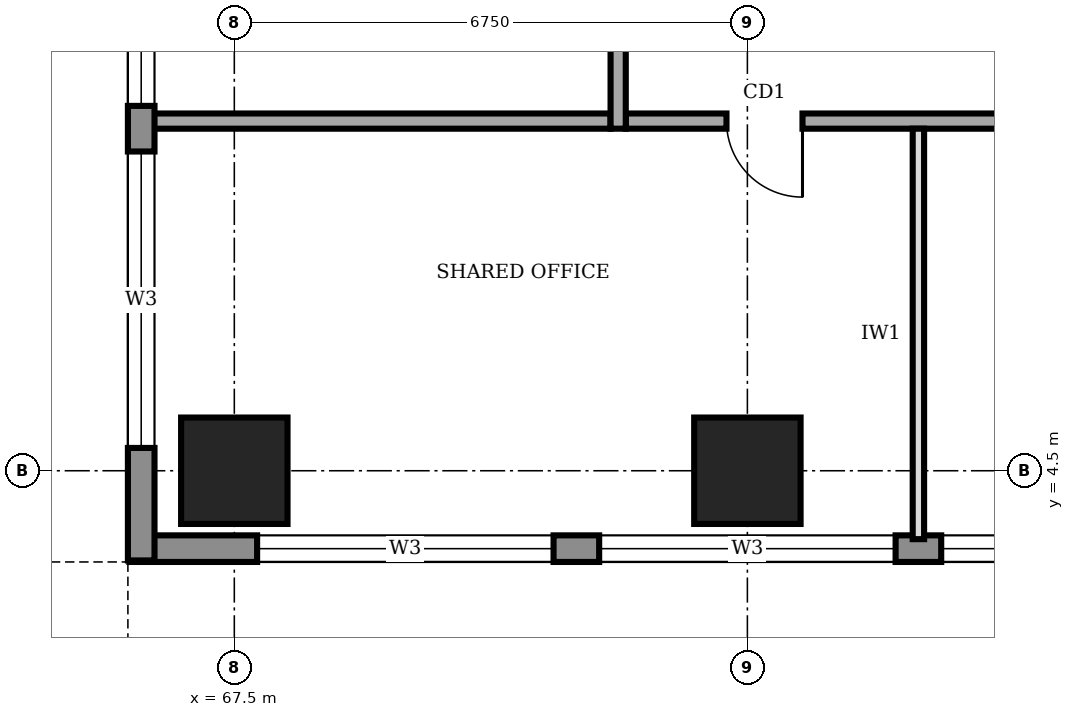
"""IFC4 building model, lengths in metres.
Left out: names, types, materials, properties, quantities, classifications, styles, units other than length and angle.
Written with IfcOpenShell. Run it as: python <this file> out.ifc"""

import sys

from ifc_helpers import new_model, si_unit, direction, frame, frame_2d, origin, origin_2d, place, context, subcontext, project, spatial, rectangle, extrude, element, fill, save


model = new_model("IFC4")
c1 = context("Model", 3, precision=1e-05, world=origin(), true_north=direction((0.0, 1.0)))
c2 = subcontext(c1, "Body", "Model", "MODEL_VIEW")
j1 = project(units=[si_unit("LENGTHUNIT", "METRE"), si_unit("PLANEANGLEUNIT", "RADIAN")], contexts=[c1])
p1 = place(None, origin())
s1 = spatial("IfcSite", under=j1, at=p1, CompositionType="ELEMENT")
p2 = place(p1, origin())
s2 = spatial("IfcBuilding", under=s1, at=p2, CompositionType="ELEMENT")
p3 = place(p2, frame((0.0, 0.0, 185.0)))
s3 = spatial("IfcBuildingStorey", under=s2, at=p3, CompositionType="ELEMENT", Elevation=185.0)
for number, where, z_axis, x_axis in (
    (1, (67.5, 4.5, 0.0), (0.0, 0.0, 1.0), (1.0, 0.0, 0.0)),
    (2, (74.25, 4.5, 0.0), (0.0, 0.0, 1.0), (1.0, 0.0, 0.0)),
):
    element("IfcColumn", number, at=place(p3, frame(where, z_axis=z_axis, x_axis=x_axis)), inside=s3, PredefinedType="COLUMN", context=c2, shape_type="SweptSolid", body=[
        extrude(rectangle(XDim=1.4, YDim=1.4, at=origin_2d()), origin(), (0.0, 0.0, 1.0), 4.0),
    ])
p4 = place(p3, frame((66.12, 3.475, 0.0), z_axis=(0.0, 0.0, 1.0), x_axis=(1.0, 0.0, 0.0)))
e3 = element("IfcWall", 3, at=p4, inside=s3, PredefinedType="STANDARD", context=c2, shape_type="SweptSolid", body=[
    extrude(rectangle(XDim=29.91, YDim=0.35, at=frame_2d((14.955, 0.0))), origin(), (0.0, 0.0, 1.0), 3.75),
])
p5 = place(p4, frame((1.68, 0.0, 0.95)))
e4 = element("IfcOpeningElement", 4, at=p5, cuts=e3, PredefinedType="OPENING", context=c2, shape_type="SweptSolid", body=[
    extrude(rectangle(XDim=3.9, YDim=1.8, at=frame_2d((1.95, 0.9))), frame((0.0, 0.185, 0.0), z_axis=(0.0, -1.0, 0.0), x_axis=(1.0, 0.0, 0.0)), (0.0, 0.0, 1.0), 0.37),
])
p6 = place(p4, frame((6.18, 0.0, 0.95)))
e5 = element("IfcOpeningElement", 5, at=p6, cuts=e3, PredefinedType="OPENING", context=c2, shape_type="SweptSolid", body=[
    extrude(rectangle(XDim=3.9, YDim=1.8, at=frame_2d((1.95, 0.9))), frame((0.0, 0.185, 0.0), z_axis=(0.0, -1.0, 0.0), x_axis=(1.0, 0.0, 0.0)), (0.0, 0.0, 1.0), 0.37),
])
p7 = place(p4, frame((10.68, 0.0, 0.95)))
e6 = element("IfcOpeningElement", 6, at=p7, cuts=e3, PredefinedType="OPENING", context=c2, shape_type="SweptSolid", body=[
    extrude(rectangle(XDim=3.9, YDim=1.8, at=frame_2d((1.95, 0.9))), frame((0.0, 0.185, 0.0), z_axis=(0.0, -1.0, 0.0), x_axis=(1.0, 0.0, 0.0)), (0.0, 0.0, 1.0), 0.37),
])
p8 = place(p4, frame((15.18, 0.0, 0.95)))
e7 = element("IfcOpeningElement", 7, at=p8, cuts=e3, PredefinedType="OPENING", context=c2, shape_type="SweptSolid", body=[
    extrude(rectangle(XDim=3.9, YDim=1.8, at=frame_2d((1.95, 0.9))), frame((0.0, 0.185, 0.0), z_axis=(0.0, -1.0, 0.0), x_axis=(1.0, 0.0, 0.0)), (0.0, 0.0, 1.0), 0.37),
])
p9 = place(p4, frame((19.68, 0.0, 0.95)))
e8 = element("IfcOpeningElement", 8, at=p9, cuts=e3, PredefinedType="OPENING", context=c2, shape_type="SweptSolid", body=[
    extrude(rectangle(XDim=3.9, YDim=1.8, at=frame_2d((1.95, 0.9))), frame((0.0, 0.185, 0.0), z_axis=(0.0, -1.0, 0.0), x_axis=(1.0, 0.0, 0.0)), (0.0, 0.0, 1.0), 0.37),
])
p10 = place(p4, frame((24.18, 0.0, 0.95)))
e9 = element("IfcOpeningElement", 9, at=p10, cuts=e3, PredefinedType="OPENING", context=c2, shape_type="SweptSolid", body=[
    extrude(rectangle(XDim=3.9, YDim=1.8, at=frame_2d((1.95, 0.9))), frame((0.0, 0.185, 0.0), z_axis=(0.0, -1.0, 0.0), x_axis=(1.0, 0.0, 0.0)), (0.0, 0.0, 1.0), 0.37),
])
p11 = place(p3, frame((66.275, 37.18, 0.0), z_axis=(0.0, 0.0, 1.0), x_axis=(0.0, -1.0, 0.0)))
e10 = element("IfcWall", 10, at=p11, inside=s3, PredefinedType="STANDARD", context=c2, shape_type="SweptSolid", body=[
    extrude(rectangle(XDim=33.86, YDim=0.35, at=frame_2d((16.93, 0.0))), origin(), (0.0, 0.0, 1.0), 3.75),
])
p12 = place(p11, frame((28.48, 0.0, 0.95)))
e11 = element("IfcOpeningElement", 11, at=p12, cuts=e10, PredefinedType="OPENING", context=c2, shape_type="SweptSolid", body=[
    extrude(rectangle(XDim=3.9, YDim=1.8, at=frame_2d((1.95, 0.9))), frame((0.0, 0.185, 0.0), z_axis=(0.0, -1.0, 0.0), x_axis=(1.0, 0.0, 0.0)), (0.0, 0.0, 1.0), 0.37),
])
p13 = place(p11, frame((23.98, 0.0, 0.95)))
e12 = element("IfcOpeningElement", 12, at=p13, cuts=e10, PredefinedType="OPENING", context=c2, shape_type="SweptSolid", body=[
    extrude(rectangle(XDim=3.9, YDim=1.8, at=frame_2d((1.95, 0.9))), frame((0.0, 0.185, 0.0), z_axis=(0.0, -1.0, 0.0), x_axis=(1.0, 0.0, 0.0)), (0.0, 0.0, 1.0), 0.37),
])
p14 = place(p11, frame((19.48, 0.0, 0.95)))
e13 = element("IfcOpeningElement", 13, at=p14, cuts=e10, PredefinedType="OPENING", context=c2, shape_type="SweptSolid", body=[
    extrude(rectangle(XDim=3.9, YDim=1.8, at=frame_2d((1.95, 0.9))), frame((0.0, 0.185, 0.0), z_axis=(0.0, -1.0, 0.0), x_axis=(1.0, 0.0, 0.0)), (0.0, 0.0, 1.0), 0.37),
])
p15 = place(p11, frame((14.98, 0.0, 0.95)))
e14 = element("IfcOpeningElement", 14, at=p15, cuts=e10, PredefinedType="OPENING", context=c2, shape_type="SweptSolid", body=[
    extrude(rectangle(XDim=3.9, YDim=1.8, at=frame_2d((1.95, 0.9))), frame((0.0, 0.185, 0.0), z_axis=(0.0, -1.0, 0.0), x_axis=(1.0, 0.0, 0.0)), (0.0, 0.0, 1.0), 0.37),
])
p16 = place(p11, frame((10.48, 0.0, 0.95)))
e15 = element("IfcOpeningElement", 15, at=p16, cuts=e10, PredefinedType="OPENING", context=c2, shape_type="SweptSolid", body=[
    extrude(rectangle(XDim=3.9, YDim=1.8, at=frame_2d((1.95, 0.9))), frame((0.0, 0.185, 0.0), z_axis=(0.0, -1.0, 0.0), x_axis=(1.0, 0.0, 0.0)), (0.0, 0.0, 1.0), 0.37),
])
p17 = place(p11, frame((5.98, 0.0, 0.95)))
e16 = element("IfcOpeningElement", 16, at=p17, cuts=e10, PredefinedType="OPENING", context=c2, shape_type="SweptSolid", body=[
    extrude(rectangle(XDim=3.9, YDim=1.8, at=frame_2d((1.95, 0.9))), frame((0.0, 0.185, 0.0), z_axis=(0.0, -1.0, 0.0), x_axis=(1.0, 0.0, 0.0)), (0.0, 0.0, 1.0), 0.37),
])
p18 = place(p11, frame((1.48, 0.0, 0.95)))
e17 = element("IfcOpeningElement", 17, at=p18, cuts=e10, PredefinedType="OPENING", context=c2, shape_type="SweptSolid", body=[
    extrude(rectangle(XDim=3.9, YDim=1.8, at=frame_2d((1.95, 0.9))), frame((0.0, 0.185, 0.0), z_axis=(0.0, -1.0, 0.0), x_axis=(1.0, 0.0, 0.0)), (0.0, 0.0, 1.0), 0.37),
])
p19 = place(p3, frame((72.65, 9.1, 0.0), z_axis=(0.0, 0.0, 1.0), x_axis=(1.0, 0.0, 0.0)))
e18 = element("IfcWall", 18, at=p19, inside=s3, PredefinedType="SOLIDWALL", context=c2, shape_type="SweptSolid", body=[
    extrude(rectangle(XDim=16.9, YDim=0.2, at=frame_2d((8.45, 0.0))), origin(), (0.0, 0.0, 1.0), 3.75),
])
p20 = place(p19, frame((1.325, 0.0, 0.0)))
e19 = element("IfcOpeningElement", 19, at=p20, cuts=e18, PredefinedType="OPENING", context=c2, shape_type="SweptSolid", body=[
    extrude(rectangle(XDim=1.0, YDim=2.1, at=frame_2d((0.5, 1.05))), frame((0.0, 0.11, 0.0), z_axis=(0.0, -1.0, 0.0), x_axis=(1.0, 0.0, 0.0)), (0.0, 0.0, 1.0), 0.22),
])
p21 = place(p19, frame((9.475, 0.0, 0.0)))
e20 = element("IfcOpeningElement", 20, at=p21, cuts=e18, PredefinedType="OPENING", context=c2, shape_type="SweptSolid", body=[
    extrude(rectangle(XDim=1.8, YDim=2.1, at=frame_2d((0.9, 1.05))), frame((0.0, 0.11, 0.0), z_axis=(0.0, -1.0, 0.0), x_axis=(1.0, 0.0, 0.0)), (0.0, 0.0, 1.0), 0.22),
])
p22 = place(p3, frame((72.55, 32.05, 0.0), z_axis=(0.0, 0.0, 1.0), x_axis=(0.0, -1.0, 0.0)))
e21 = element("IfcWall", 21, at=p22, inside=s3, PredefinedType="SOLIDWALL", context=c2, shape_type="SweptSolid", body=[
    extrude(rectangle(XDim=23.05, YDim=0.2, at=frame_2d((11.525, 0.0))), origin(), (0.0, 0.0, 1.0), 3.75),
])
p23 = place(p22, frame((20.3, 0.0, 0.0)))
e22 = element("IfcOpeningElement", 22, at=p23, cuts=e21, PredefinedType="OPENING", context=c2, shape_type="SweptSolid", body=[
    extrude(rectangle(XDim=1.0, YDim=2.1, at=frame_2d((0.5, 1.05))), frame((0.0, 0.11, 0.0), z_axis=(0.0, -1.0, 0.0), x_axis=(1.0, 0.0, 0.0)), (0.0, 0.0, 1.0), 0.22),
])
p24 = place(p22, frame((15.875, 0.0, 0.0)))
e23 = element("IfcOpeningElement", 23, at=p24, cuts=e21, PredefinedType="OPENING", context=c2, shape_type="SweptSolid", body=[
    extrude(rectangle(XDim=1.0, YDim=2.1, at=frame_2d((0.5, 1.05))), frame((0.0, 0.11, 0.0), z_axis=(0.0, -1.0, 0.0), x_axis=(1.0, 0.0, 0.0)), (0.0, 0.0, 1.0), 0.22),
])
p25 = place(p22, frame((11.3, 0.0, 0.0)))
e24 = element("IfcOpeningElement", 24, at=p25, cuts=e21, PredefinedType="OPENING", context=c2, shape_type="SweptSolid", body=[
    extrude(rectangle(XDim=1.0, YDim=2.1, at=frame_2d((0.5, 1.05))), frame((0.0, 0.11, 0.0), z_axis=(0.0, -1.0, 0.0), x_axis=(1.0, 0.0, 0.0)), (0.0, 0.0, 1.0), 0.22),
])
p26 = place(p22, frame((6.725, 0.0, 0.0)))
e25 = element("IfcOpeningElement", 25, at=p26, cuts=e21, PredefinedType="OPENING", context=c2, shape_type="SweptSolid", body=[
    extrude(rectangle(XDim=1.0, YDim=2.1, at=frame_2d((0.5, 1.05))), frame((0.0, 0.11, 0.0), z_axis=(0.0, -1.0, 0.0), x_axis=(1.0, 0.0, 0.0)), (0.0, 0.0, 1.0), 0.22),
])
p27 = place(p22, frame((1.925, 0.0, 0.0)))
e26 = element("IfcOpeningElement", 26, at=p27, cuts=e21, PredefinedType="OPENING", context=c2, shape_type="SweptSolid", body=[
    extrude(rectangle(XDim=1.0, YDim=2.1, at=frame_2d((0.5, 1.05))), frame((0.0, 0.11, 0.0), z_axis=(0.0, -1.0, 0.0), x_axis=(1.0, 0.0, 0.0)), (0.0, 0.0, 1.0), 0.22),
])
p28 = place(p3, frame((66.4, 9.1, 0.0), z_axis=(0.0, 0.0, 1.0), x_axis=(1.0, 0.0, 0.0)))
e27 = element("IfcWall", 27, at=p28, inside=s3, PredefinedType="SOLIDWALL", context=c2, shape_type="SweptSolid", body=[
    extrude(rectangle(XDim=6.05, YDim=0.2, at=frame_2d((3.025, 0.0))), origin(), (0.0, 0.0, 1.0), 3.75),
])
p29 = place(p3, frame((76.5, 3.6, 0.0), z_axis=(0.0, 0.0, 1.0), x_axis=(0.0, 1.0, 0.0)))
e28 = element("IfcWall", 28, at=p29, inside=s3, PredefinedType="PARTITIONING", context=c2, shape_type="SweptSolid", body=[
    extrude(rectangle(XDim=5.4, YDim=0.15, at=frame_2d((2.7, 0.0))), origin(), (0.0, 0.0, 1.0), 3.75),
])
p30 = place(p5, origin())
e29 = element("IfcWindow", 29, at=p30, inside=s3, PartitioningType="SINGLE_PANEL", PredefinedType="WINDOW", context=c2, shape_type="SweptSolid", body=[
    extrude(rectangle(XDim=3.9, YDim=1.8, at=frame_2d((1.95, 0.9))), frame((0.0, 0.03, 0.0), z_axis=(0.0, -1.0, 0.0), x_axis=(1.0, 0.0, 0.0)), (0.0, 0.0, 1.0), 0.06),
])
fill(e4, e29)
p31 = place(p6, origin())
e30 = element("IfcWindow", 30, at=p31, inside=s3, PartitioningType="SINGLE_PANEL", PredefinedType="WINDOW", context=c2, shape_type="SweptSolid", body=[
    extrude(rectangle(XDim=3.9, YDim=1.8, at=frame_2d((1.95, 0.9))), frame((0.0, 0.03, 0.0), z_axis=(0.0, -1.0, 0.0), x_axis=(1.0, 0.0, 0.0)), (0.0, 0.0, 1.0), 0.06),
])
fill(e5, e30)
p32 = place(p7, origin())
e31 = element("IfcWindow", 31, at=p32, inside=s3, PartitioningType="SINGLE_PANEL", PredefinedType="WINDOW", context=c2, shape_type="SweptSolid", body=[
    extrude(rectangle(XDim=3.9, YDim=1.8, at=frame_2d((1.95, 0.9))), frame((0.0, 0.03, 0.0), z_axis=(0.0, -1.0, 0.0), x_axis=(1.0, 0.0, 0.0)), (0.0, 0.0, 1.0), 0.06),
])
fill(e6, e31)
p33 = place(p12, origin())
e32 = element("IfcWindow", 32, at=p33, inside=s3, PartitioningType="SINGLE_PANEL", PredefinedType="WINDOW", context=c2, shape_type="SweptSolid", body=[
    extrude(rectangle(XDim=3.9, YDim=1.8, at=frame_2d((1.95, 0.9))), frame((0.0, 0.03, 0.0), z_axis=(0.0, -1.0, 0.0), x_axis=(1.0, 0.0, 0.0)), (0.0, 0.0, 1.0), 0.06),
])
fill(e11, e32)
p34 = place(p13, origin())
e33 = element("IfcWindow", 33, at=p34, inside=s3, PartitioningType="SINGLE_PANEL", PredefinedType="WINDOW", context=c2, shape_type="SweptSolid", body=[
    extrude(rectangle(XDim=3.9, YDim=1.8, at=frame_2d((1.95, 0.9))), frame((0.0, 0.03, 0.0), z_axis=(0.0, -1.0, 0.0), x_axis=(1.0, 0.0, 0.0)), (0.0, 0.0, 1.0), 0.06),
])
fill(e12, e33)
p35 = place(p20, frame((1.0, 0.0, 0.0), z_axis=(0.0, 0.0, 1.0), x_axis=(-1.0, 0.0, 0.0)))
e34 = element("IfcDoor", 34, at=p35, inside=s3, OperationType="SINGLE_SWING_LEFT", PredefinedType="DOOR", context=c2, shape_type="SweptSolid", body=[
    extrude(rectangle(XDim=1.0, YDim=2.1, at=frame_2d((0.5, 1.05))), frame((0.0, 0.025, 0.0), z_axis=(0.0, -1.0, 0.0), x_axis=(1.0, 0.0, 0.0)), (0.0, 0.0, 1.0), 0.05),
])
fill(e19, e34)
save(model, sys.argv[1])
